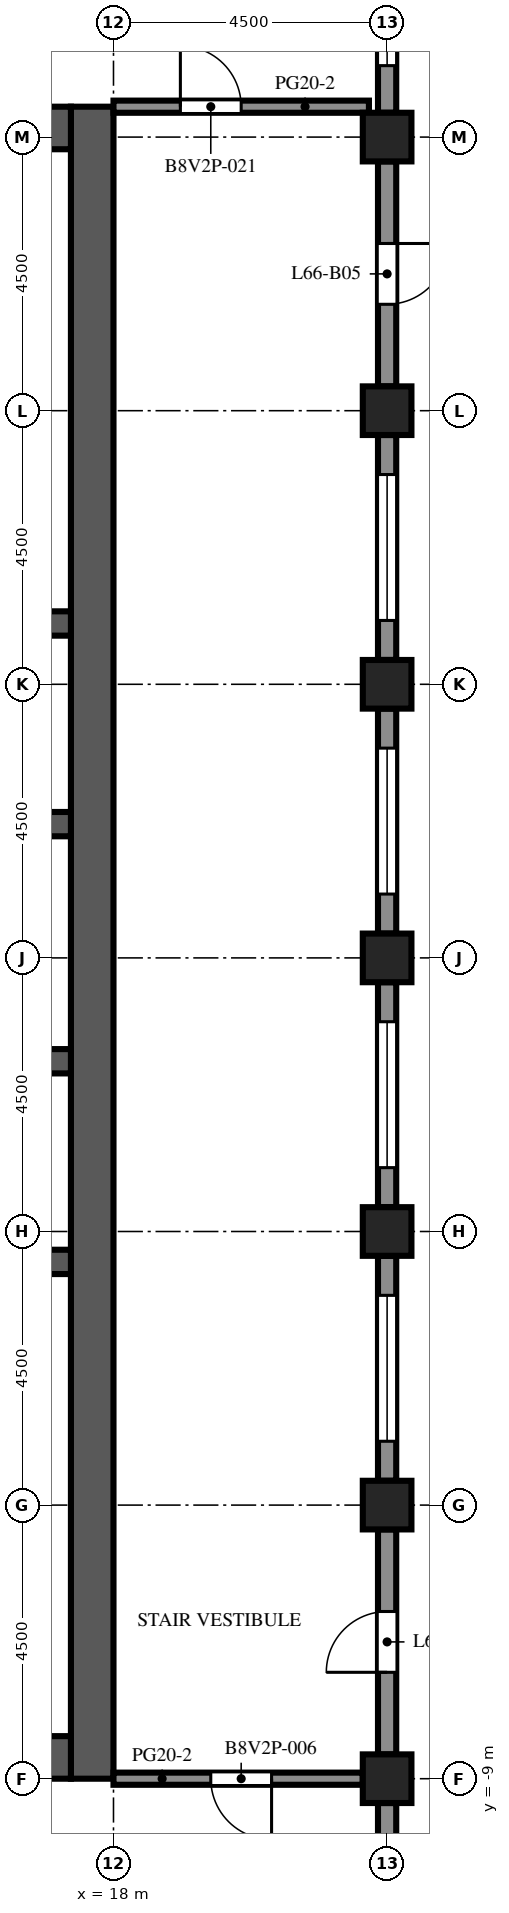
"""IFC4 building model, lengths in metres.
Left out: names, types, materials, properties, quantities, classifications, styles, units other than length and angle.
Written with IfcOpenShell. Run it as: python <this file> out.ifc"""

import sys

from ifc_helpers import new_model, si_unit, direction, frame, frame_2d, origin, origin_2d, place, context, subcontext, project, spatial, rectangle, extrude, element, fill, save


model = new_model("IFC4")
c1 = context("Model", 3, precision=1e-05, world=origin(), true_north=direction((0.0, 1.0)))
c2 = subcontext(c1, "Body", "Model", "MODEL_VIEW")
j1 = project(units=[si_unit("LENGTHUNIT", "METRE"), si_unit("PLANEANGLEUNIT", "RADIAN")], contexts=[c1])
p1 = place(None, origin())
s1 = spatial("IfcSite", under=j1, at=p1, CompositionType="ELEMENT")
p2 = place(p1, origin())
s2 = spatial("IfcBuilding", under=s1, at=p2, CompositionType="ELEMENT")
p3 = place(p2, frame((0.0, 0.0, 290.9)))
s3 = spatial("IfcBuildingStorey", under=s2, at=p3, CompositionType="ELEMENT", Elevation=290.9)
for number, where, z_axis, x_axis in (
    (1, (22.5, -9.0, 0.0), (0.0, 0.0, 1.0), (1.0, 0.0, 0.0)),
    (2, (22.5, -4.5, 0.0), (0.0, 0.0, 1.0), (1.0, 0.0, 0.0)),
    (3, (22.5, 0.0, 0.0), (0.0, 0.0, 1.0), (1.0, 0.0, 0.0)),
    (4, (22.5, 4.5, 0.0), (0.0, 0.0, 1.0), (1.0, 0.0, 0.0)),
    (5, (22.5, 9.0, 0.0), (0.0, 0.0, 1.0), (1.0, 0.0, 0.0)),
    (6, (22.5, 13.5, 0.0), (0.0, 0.0, 1.0), (1.0, 0.0, 0.0)),
    (7, (22.5, 18.0, 0.0), (0.0, 0.0, 1.0), (1.0, 0.0, 0.0)),
):
    element("IfcColumn", number, at=place(p3, frame(where, z_axis=z_axis, x_axis=x_axis)), inside=s3, PredefinedType="COLUMN", context=c2, shape_type="SweptSolid", body=[
        extrude(rectangle(XDim=0.8, YDim=0.8, at=origin_2d()), origin(), (0.0, 0.0, 1.0), 4.1),
    ])
p4 = place(p3, frame((17.65, -9.0, 0.0), z_axis=(0.0, 0.0, 1.0), x_axis=(0.0, 1.0, 0.0)))
e8 = element("IfcWall", 8, at=p4, inside=s3, PredefinedType="SHEAR", context=c2, shape_type="SweptSolid", body=[
    extrude(rectangle(XDim=27.5, YDim=0.7, at=frame_2d((13.75, 0.0))), origin(), (0.0, 0.0, 1.0), 4.1),
])
p5 = place(p4, frame((12.55, 0.0, 0.0)))
e9 = element("IfcOpeningElement", 9, at=p5, cuts=e8, PredefinedType="OPENING", context=c2, shape_type="SweptSolid", body=[
    extrude(rectangle(XDim=2.4, YDim=2.4, at=frame_2d((1.2, 1.2))), frame((0.0, 0.36, 0.0), z_axis=(0.0, -1.0, 0.0), x_axis=(1.0, 0.0, 0.0)), (0.0, 0.0, 1.0), 0.72),
])
p6 = place(p4, frame((6.825, 0.0, 0.0)))
e10 = element("IfcOpeningElement", 10, at=p6, cuts=e8, PredefinedType="OPENING", context=c2, shape_type="SweptSolid", body=[
    extrude(rectangle(XDim=1.2, YDim=2.1, at=frame_2d((0.6, 1.05))), frame((0.0, 0.36, 0.0), z_axis=(0.0, -1.0, 0.0), x_axis=(1.0, 0.0, 0.0)), (0.0, 0.0, 1.0), 0.72),
])
p7 = place(p4, frame((19.475, 0.0, 0.0)))
e11 = element("IfcOpeningElement", 11, at=p7, cuts=e8, PredefinedType="OPENING", context=c2, shape_type="SweptSolid", body=[
    extrude(rectangle(XDim=1.2, YDim=2.1, at=frame_2d((0.6, 1.05))), frame((0.0, 0.36, 0.0), z_axis=(0.0, -1.0, 0.0), x_axis=(1.0, 0.0, 0.0)), (0.0, 0.0, 1.0), 0.72),
])
for number, where, z_axis, x_axis in (
    (12, (6.7, -8.65, 0.0), (0.0, 0.0, 1.0), (1.0, 0.0, 0.0)),
    (13, (6.7, 18.15, 0.0), (0.0, 0.0, 1.0), (1.0, 0.0, 0.0)),
):
    element("IfcWall", number, at=place(p3, frame(where, z_axis=z_axis, x_axis=x_axis)), inside=s3, PredefinedType="SHEAR", context=c2, shape_type="SweptSolid", body=[
        extrude(rectangle(XDim=10.6, YDim=0.7, at=frame_2d((5.3, 0.0))), origin(), (0.0, 0.0, 1.0), 4.1),
    ])
p8 = place(p3, frame((6.7, -0.5, 0.0), z_axis=(0.0, 0.0, 1.0), x_axis=(1.0, 0.0, 0.0)))
e14 = element("IfcWall", 14, at=p8, inside=s3, PredefinedType="SHEAR", context=c2, shape_type="SweptSolid", body=[
    extrude(rectangle(XDim=10.6, YDim=0.4, at=frame_2d((5.3, 0.0))), origin(), (0.0, 0.0, 1.0), 4.1),
])
p9 = place(p3, frame((6.7, 2.8, 0.0), z_axis=(0.0, 0.0, 1.0), x_axis=(1.0, 0.0, 0.0)))
e15 = element("IfcWall", 15, at=p9, inside=s3, PredefinedType="SHEAR", context=c2, shape_type="SweptSolid", body=[
    extrude(rectangle(XDim=10.6, YDim=0.4, at=frame_2d((5.3, 0.0))), origin(), (0.0, 0.0, 1.0), 4.1),
])
p10 = place(p9, frame((0.688, 0.0, 0.0)))
e16 = element("IfcOpeningElement", 16, at=p10, cuts=e15, PredefinedType="OPENING", context=c2, shape_type="SweptSolid", body=[
    extrude(rectangle(XDim=1.1, YDim=2.1, at=frame_2d((0.55, 1.05))), frame((0.0, 0.21, 0.0), z_axis=(0.0, -1.0, 0.0), x_axis=(1.0, 0.0, 0.0)), (0.0, 0.0, 1.0), 0.42),
])
p11 = place(p9, frame((3.438, 0.0, 0.0)))
e17 = element("IfcOpeningElement", 17, at=p11, cuts=e15, PredefinedType="OPENING", context=c2, shape_type="SweptSolid", body=[
    extrude(rectangle(XDim=1.1, YDim=2.1, at=frame_2d((0.55, 1.05))), frame((0.0, 0.21, 0.0), z_axis=(0.0, -1.0, 0.0), x_axis=(1.0, 0.0, 0.0)), (0.0, 0.0, 1.0), 0.42),
])
p12 = place(p9, frame((6.113, 0.0, 0.0)))
e18 = element("IfcOpeningElement", 18, at=p12, cuts=e15, PredefinedType="OPENING", context=c2, shape_type="SweptSolid", body=[
    extrude(rectangle(XDim=1.0, YDim=2.1, at=frame_2d((0.5, 1.05))), frame((0.0, 0.21, 0.0), z_axis=(0.0, -1.0, 0.0), x_axis=(1.0, 0.0, 0.0)), (0.0, 0.0, 1.0), 0.42),
])
p13 = place(p9, frame((8.863, 0.0, 0.0)))
e19 = element("IfcOpeningElement", 19, at=p13, cuts=e15, PredefinedType="OPENING", context=c2, shape_type="SweptSolid", body=[
    extrude(rectangle(XDim=1.0, YDim=2.1, at=frame_2d((0.5, 1.05))), frame((0.0, 0.21, 0.0), z_axis=(0.0, -1.0, 0.0), x_axis=(1.0, 0.0, 0.0)), (0.0, 0.0, 1.0), 0.42),
])
p14 = place(p3, frame((6.7, 6.7, 0.0), z_axis=(0.0, 0.0, 1.0), x_axis=(1.0, 0.0, 0.0)))
e20 = element("IfcWall", 20, at=p14, inside=s3, PredefinedType="SHEAR", context=c2, shape_type="SweptSolid", body=[
    extrude(rectangle(XDim=10.6, YDim=0.4, at=frame_2d((5.3, 0.0))), origin(), (0.0, 0.0, 1.0), 4.1),
])
p15 = place(p14, frame((3.438, 0.0, 0.0)))
e21 = element("IfcOpeningElement", 21, at=p15, cuts=e20, PredefinedType="OPENING", context=c2, shape_type="SweptSolid", body=[
    extrude(rectangle(XDim=1.1, YDim=2.1, at=frame_2d((0.55, 1.05))), frame((0.0, 0.21, 0.0), z_axis=(0.0, -1.0, 0.0), x_axis=(1.0, 0.0, 0.0)), (0.0, 0.0, 1.0), 0.42),
])
p16 = place(p14, frame((6.062, 0.0, 0.0)))
e22 = element("IfcOpeningElement", 22, at=p16, cuts=e20, PredefinedType="OPENING", context=c2, shape_type="SweptSolid", body=[
    extrude(rectangle(XDim=1.1, YDim=2.1, at=frame_2d((0.55, 1.05))), frame((0.0, 0.21, 0.0), z_axis=(0.0, -1.0, 0.0), x_axis=(1.0, 0.0, 0.0)), (0.0, 0.0, 1.0), 0.42),
])
p17 = place(p14, frame((8.812, 0.0, 0.0)))
e23 = element("IfcOpeningElement", 23, at=p17, cuts=e20, PredefinedType="OPENING", context=c2, shape_type="SweptSolid", body=[
    extrude(rectangle(XDim=1.1, YDim=2.1, at=frame_2d((0.55, 1.05))), frame((0.0, 0.21, 0.0), z_axis=(0.0, -1.0, 0.0), x_axis=(1.0, 0.0, 0.0)), (0.0, 0.0, 1.0), 0.42),
])
p18 = place(p14, frame((0.738, 0.0, 0.0)))
e24 = element("IfcOpeningElement", 24, at=p18, cuts=e20, PredefinedType="OPENING", context=c2, shape_type="SweptSolid", body=[
    extrude(rectangle(XDim=1.0, YDim=2.1, at=frame_2d((0.5, 1.05))), frame((0.0, 0.21, 0.0), z_axis=(0.0, -1.0, 0.0), x_axis=(1.0, 0.0, 0.0)), (0.0, 0.0, 1.0), 0.42),
])
p19 = place(p3, frame((6.7, 10.0, 0.0), z_axis=(0.0, 0.0, 1.0), x_axis=(1.0, 0.0, 0.0)))
e25 = element("IfcWall", 25, at=p19, inside=s3, PredefinedType="SHEAR", context=c2, shape_type="SweptSolid", body=[
    extrude(rectangle(XDim=10.6, YDim=0.4, at=frame_2d((5.3, 0.0))), origin(), (0.0, 0.0, 1.0), 4.1),
])
p20 = place(p3, frame((22.5, -9.4, 0.0), z_axis=(0.0, 0.0, 1.0), x_axis=(0.0, -1.0, 0.0)))
e26 = element("IfcWall", 26, at=p20, inside=s3, PredefinedType="SOLIDWALL", context=c2, shape_type="SweptSolid", body=[
    extrude(rectangle(XDim=3.7, YDim=0.3, at=frame_2d((1.85, 0.0))), origin(), (0.0, 0.0, 1.0), 2.7),
])
p21 = place(p20, frame((0.65, 0.0, 0.8)))
e27 = element("IfcOpeningElement", 27, at=p21, cuts=e26, PredefinedType="OPENING", context=c2, shape_type="SweptSolid", body=[
    extrude(rectangle(XDim=2.4, YDim=1.7, at=frame_2d((1.2, 0.85))), frame((0.0, 0.16, 0.0), z_axis=(0.0, -1.0, 0.0), x_axis=(1.0, 0.0, 0.0)), (0.0, 0.0, 1.0), 0.32),
])
p22 = place(p3, frame((22.5, -4.9, 0.0), z_axis=(0.0, 0.0, 1.0), x_axis=(0.0, -1.0, 0.0)))
e28 = element("IfcWall", 28, at=p22, inside=s3, PredefinedType="SOLIDWALL", context=c2, shape_type="SweptSolid", body=[
    extrude(rectangle(XDim=3.7, YDim=0.3, at=frame_2d((1.85, 0.0))), origin(), (0.0, 0.0, 1.0), 2.7),
])
p23 = place(p22, frame((1.35, 0.0, 0.0)))
e29 = element("IfcOpeningElement", 29, at=p23, cuts=e28, PredefinedType="OPENING", context=c2, shape_type="SweptSolid", body=[
    extrude(rectangle(XDim=1.0, YDim=2.2, at=frame_2d((0.5, 1.1))), frame((0.0, 0.16, 0.0), z_axis=(0.0, -1.0, 0.0), x_axis=(1.0, 0.0, 0.0)), (0.0, 0.0, 1.0), 0.32),
])
p24 = place(p3, frame((22.5, -0.4, 0.0), z_axis=(0.0, 0.0, 1.0), x_axis=(0.0, -1.0, 0.0)))
e30 = element("IfcWall", 30, at=p24, inside=s3, PredefinedType="SOLIDWALL", context=c2, shape_type="SweptSolid", body=[
    extrude(rectangle(XDim=3.7, YDim=0.3, at=frame_2d((1.85, 0.0))), origin(), (0.0, 0.0, 1.0), 2.7),
])
p25 = place(p24, frame((0.65, 0.0, 0.8)))
e31 = element("IfcOpeningElement", 31, at=p25, cuts=e30, PredefinedType="OPENING", context=c2, shape_type="SweptSolid", body=[
    extrude(rectangle(XDim=2.4, YDim=1.7, at=frame_2d((1.2, 0.85))), frame((0.0, 0.16, 0.0), z_axis=(0.0, -1.0, 0.0), x_axis=(1.0, 0.0, 0.0)), (0.0, 0.0, 1.0), 0.32),
])
p26 = place(p3, frame((22.5, 4.1, 0.0), z_axis=(0.0, 0.0, 1.0), x_axis=(0.0, -1.0, 0.0)))
e32 = element("IfcWall", 32, at=p26, inside=s3, PredefinedType="SOLIDWALL", context=c2, shape_type="SweptSolid", body=[
    extrude(rectangle(XDim=3.7, YDim=0.3, at=frame_2d((1.85, 0.0))), origin(), (0.0, 0.0, 1.0), 2.7),
])
p27 = place(p26, frame((0.65, 0.0, 0.8)))
e33 = element("IfcOpeningElement", 33, at=p27, cuts=e32, PredefinedType="OPENING", context=c2, shape_type="SweptSolid", body=[
    extrude(rectangle(XDim=2.4, YDim=1.7, at=frame_2d((1.2, 0.85))), frame((0.0, 0.16, 0.0), z_axis=(0.0, -1.0, 0.0), x_axis=(1.0, 0.0, 0.0)), (0.0, 0.0, 1.0), 0.32),
])
p28 = place(p3, frame((22.5, 8.6, 0.0), z_axis=(0.0, 0.0, 1.0), x_axis=(0.0, -1.0, 0.0)))
e34 = element("IfcWall", 34, at=p28, inside=s3, PredefinedType="SOLIDWALL", context=c2, shape_type="SweptSolid", body=[
    extrude(rectangle(XDim=3.7, YDim=0.3, at=frame_2d((1.85, 0.0))), origin(), (0.0, 0.0, 1.0), 2.7),
])
p29 = place(p28, frame((0.65, 0.0, 0.8)))
e35 = element("IfcOpeningElement", 35, at=p29, cuts=e34, PredefinedType="OPENING", context=c2, shape_type="SweptSolid", body=[
    extrude(rectangle(XDim=2.4, YDim=1.7, at=frame_2d((1.2, 0.85))), frame((0.0, 0.16, 0.0), z_axis=(0.0, -1.0, 0.0), x_axis=(1.0, 0.0, 0.0)), (0.0, 0.0, 1.0), 0.32),
])
p30 = place(p3, frame((22.5, 13.1, 0.0), z_axis=(0.0, 0.0, 1.0), x_axis=(0.0, -1.0, 0.0)))
e36 = element("IfcWall", 36, at=p30, inside=s3, PredefinedType="SOLIDWALL", context=c2, shape_type="SweptSolid", body=[
    extrude(rectangle(XDim=3.7, YDim=0.3, at=frame_2d((1.85, 0.0))), origin(), (0.0, 0.0, 1.0), 2.7),
])
p31 = place(p30, frame((0.65, 0.0, 0.8)))
e37 = element("IfcOpeningElement", 37, at=p31, cuts=e36, PredefinedType="OPENING", context=c2, shape_type="SweptSolid", body=[
    extrude(rectangle(XDim=2.4, YDim=1.7, at=frame_2d((1.2, 0.85))), frame((0.0, 0.16, 0.0), z_axis=(0.0, -1.0, 0.0), x_axis=(1.0, 0.0, 0.0)), (0.0, 0.0, 1.0), 0.32),
])
p32 = place(p3, frame((22.5, 17.6, 0.0), z_axis=(0.0, 0.0, 1.0), x_axis=(0.0, -1.0, 0.0)))
e38 = element("IfcWall", 38, at=p32, inside=s3, PredefinedType="SOLIDWALL", context=c2, shape_type="SweptSolid", body=[
    extrude(rectangle(XDim=3.7, YDim=0.3, at=frame_2d((1.85, 0.0))), origin(), (0.0, 0.0, 1.0), 2.7),
])
p33 = place(p32, frame((1.35, 0.0, 0.0)))
e39 = element("IfcOpeningElement", 39, at=p33, cuts=e38, PredefinedType="OPENING", context=c2, shape_type="SweptSolid", body=[
    extrude(rectangle(XDim=1.0, YDim=2.2, at=frame_2d((0.5, 1.1))), frame((0.0, 0.16, 0.0), z_axis=(0.0, -1.0, 0.0), x_axis=(1.0, 0.0, 0.0)), (0.0, 0.0, 1.0), 0.32),
])
p34 = place(p3, frame((22.5, 22.1, 0.0), z_axis=(0.0, 0.0, 1.0), x_axis=(0.0, -1.0, 0.0)))
e40 = element("IfcWall", 40, at=p34, inside=s3, PredefinedType="SOLIDWALL", context=c2, shape_type="SweptSolid", body=[
    extrude(rectangle(XDim=3.7, YDim=0.3, at=frame_2d((1.85, 0.0))), origin(), (0.0, 0.0, 1.0), 2.7),
])
p35 = place(p34, frame((0.525, 0.0, 0.8)))
e41 = element("IfcOpeningElement", 41, at=p35, cuts=e40, PredefinedType="OPENING", context=c2, shape_type="SweptSolid", body=[
    extrude(rectangle(XDim=2.4, YDim=1.7, at=frame_2d((1.2, 0.85))), frame((0.0, 0.16, 0.0), z_axis=(0.0, -1.0, 0.0), x_axis=(1.0, 0.0, 0.0)), (0.0, 0.0, 1.0), 0.32),
])
p36 = place(p3, frame((22.1, -9.0, 0.0), z_axis=(0.0, 0.0, 1.0), x_axis=(-1.0, 0.0, 0.0)))
e42 = element("IfcWall", 42, at=p36, inside=s3, PredefinedType="PARTITIONING", context=c2, shape_type="SweptSolid", body=[
    extrude(rectangle(XDim=4.1, YDim=0.2, at=frame_2d((2.05, 0.0))), origin(), (0.0, 0.0, 1.0), 3.5),
])
p37 = place(p36, frame((1.5, 0.0, 0.0)))
e43 = element("IfcOpeningElement", 43, at=p37, cuts=e42, PredefinedType="OPENING", context=c2, shape_type="SweptSolid", body=[
    extrude(rectangle(XDim=1.0, YDim=2.1, at=frame_2d((0.5, 1.05))), frame((0.0, 0.11, 0.0), z_axis=(0.0, -1.0, 0.0), x_axis=(1.0, 0.0, 0.0)), (0.0, 0.0, 1.0), 0.22),
])
p38 = place(p3, frame((18.0, 18.5, 0.0), z_axis=(0.0, 0.0, 1.0), x_axis=(1.0, 0.0, 0.0)))
e44 = element("IfcWall", 44, at=p38, inside=s3, PredefinedType="PARTITIONING", context=c2, shape_type="SweptSolid", body=[
    extrude(rectangle(XDim=4.201, YDim=0.2, at=frame_2d((2.101, 0.0))), origin(), (0.0, 0.0, 1.0), 3.5),
])
p39 = place(p38, frame((1.1, 0.0, 0.0)))
e45 = element("IfcOpeningElement", 45, at=p39, cuts=e44, PredefinedType="OPENING", context=c2, shape_type="SweptSolid", body=[
    extrude(rectangle(XDim=1.0, YDim=2.1, at=frame_2d((0.5, 1.05))), frame((0.0, 0.11, 0.0), z_axis=(0.0, -1.0, 0.0), x_axis=(1.0, 0.0, 0.0)), (0.0, 0.0, 1.0), 0.22),
])
p40 = place(p23, origin())
e46 = element("IfcDoor", 46, at=p40, inside=s3, OperationType="SINGLE_SWING_RIGHT", PredefinedType="DOOR", context=c2, shape_type="SweptSolid", body=[
    extrude(rectangle(XDim=1.0, YDim=2.2, at=frame_2d((0.5, 1.1))), frame((0.0, 0.025, 0.0), z_axis=(0.0, -1.0, 0.0), x_axis=(1.0, 0.0, 0.0)), (0.0, 0.0, 1.0), 0.05),
])
fill(e29, e46)
p41 = place(p25, origin())
e47 = element("IfcWindow", 47, at=p41, inside=s3, PartitioningType="SINGLE_PANEL", PredefinedType="WINDOW", context=c2, shape_type="SweptSolid", body=[
    extrude(rectangle(XDim=2.4, YDim=1.7, at=frame_2d((1.2, 0.85))), frame((0.0, 0.03, 0.0), z_axis=(0.0, -1.0, 0.0), x_axis=(1.0, 0.0, 0.0)), (0.0, 0.0, 1.0), 0.06),
])
fill(e31, e47)
p42 = place(p27, origin())
e48 = element("IfcWindow", 48, at=p42, inside=s3, PartitioningType="SINGLE_PANEL", PredefinedType="WINDOW", context=c2, shape_type="SweptSolid", body=[
    extrude(rectangle(XDim=2.4, YDim=1.7, at=frame_2d((1.2, 0.85))), frame((0.0, 0.03, 0.0), z_axis=(0.0, -1.0, 0.0), x_axis=(1.0, 0.0, 0.0)), (0.0, 0.0, 1.0), 0.06),
])
fill(e33, e48)
p43 = place(p29, origin())
e49 = element("IfcWindow", 49, at=p43, inside=s3, PartitioningType="SINGLE_PANEL", PredefinedType="WINDOW", context=c2, shape_type="SweptSolid", body=[
    extrude(rectangle(XDim=2.4, YDim=1.7, at=frame_2d((1.2, 0.85))), frame((0.0, 0.03, 0.0), z_axis=(0.0, -1.0, 0.0), x_axis=(1.0, 0.0, 0.0)), (0.0, 0.0, 1.0), 0.06),
])
fill(e35, e49)
p44 = place(p31, origin())
e50 = element("IfcWindow", 50, at=p44, inside=s3, PartitioningType="SINGLE_PANEL", PredefinedType="WINDOW", context=c2, shape_type="SweptSolid", body=[
    extrude(rectangle(XDim=2.4, YDim=1.7, at=frame_2d((1.2, 0.85))), frame((0.0, 0.03, 0.0), z_axis=(0.0, -1.0, 0.0), x_axis=(1.0, 0.0, 0.0)), (0.0, 0.0, 1.0), 0.06),
])
fill(e37, e50)
p45 = place(p33, origin())
e51 = element("IfcDoor", 51, at=p45, inside=s3, OperationType="SINGLE_SWING_LEFT", PredefinedType="DOOR", context=c2, shape_type="SweptSolid", body=[
    extrude(rectangle(XDim=1.0, YDim=2.2, at=frame_2d((0.5, 1.1))), frame((0.0, 0.025, 0.0), z_axis=(0.0, -1.0, 0.0), x_axis=(1.0, 0.0, 0.0)), (0.0, 0.0, 1.0), 0.05),
])
fill(e39, e51)
p46 = place(p35, origin())
e52 = element("IfcWindow", 52, at=p46, inside=s3, PartitioningType="SINGLE_PANEL", PredefinedType="WINDOW", context=c2, shape_type="SweptSolid", body=[
    extrude(rectangle(XDim=2.4, YDim=1.7, at=frame_2d((1.2, 0.85))), frame((0.0, 0.03, 0.0), z_axis=(0.0, -1.0, 0.0), x_axis=(1.0, 0.0, 0.0)), (0.0, 0.0, 1.0), 0.06),
])
fill(e41, e52)
p47 = place(p5, origin())
e53 = element("IfcDoor", 53, at=p47, inside=s3, OperationType="DOUBLE_DOOR_DOUBLE_SWING", PredefinedType="DOOR", context=c2, shape_type="SweptSolid", body=[
    extrude(rectangle(XDim=2.4, YDim=2.4, at=frame_2d((1.2, 1.2))), frame((0.0, 0.025, 0.0), z_axis=(0.0, -1.0, 0.0), x_axis=(1.0, 0.0, 0.0)), (0.0, 0.0, 1.0), 0.05),
])
fill(e9, e53)
p48 = place(p6, frame((1.2, 0.0, 0.0), z_axis=(0.0, 0.0, 1.0), x_axis=(-1.0, 0.0, 0.0)))
e54 = element("IfcDoor", 54, at=p48, inside=s3, OperationType="SINGLE_SWING_LEFT", PredefinedType="DOOR", context=c2, shape_type="SweptSolid", body=[
    extrude(rectangle(XDim=1.2, YDim=2.1, at=frame_2d((0.6, 1.05))), frame((0.0, 0.025, 0.0), z_axis=(0.0, -1.0, 0.0), x_axis=(1.0, 0.0, 0.0)), (0.0, 0.0, 1.0), 0.05),
])
fill(e10, e54)
p49 = place(p7, frame((1.2, 0.0, 0.0), z_axis=(0.0, 0.0, 1.0), x_axis=(-1.0, 0.0, 0.0)))
e55 = element("IfcDoor", 55, at=p49, inside=s3, OperationType="SINGLE_SWING_LEFT", PredefinedType="DOOR", context=c2, shape_type="SweptSolid", body=[
    extrude(rectangle(XDim=1.2, YDim=2.1, at=frame_2d((0.6, 1.05))), frame((0.0, 0.025, 0.0), z_axis=(0.0, -1.0, 0.0), x_axis=(1.0, 0.0, 0.0)), (0.0, 0.0, 1.0), 0.05),
])
fill(e11, e55)
p50 = place(p37, origin())
e56 = element("IfcDoor", 56, at=p50, inside=s3, OperationType="SINGLE_SWING_LEFT", PredefinedType="DOOR", context=c2, shape_type="SweptSolid", body=[
    extrude(rectangle(XDim=1.0, YDim=2.1, at=frame_2d((0.5, 1.05))), frame((0.0, 0.025, 0.0), z_axis=(0.0, -1.0, 0.0), x_axis=(1.0, 0.0, 0.0)), (0.0, 0.0, 1.0), 0.05),
])
fill(e43, e56)
p51 = place(p39, origin())
e57 = element("IfcDoor", 57, at=p51, inside=s3, OperationType="SINGLE_SWING_LEFT", PredefinedType="DOOR", context=c2, shape_type="SweptSolid", body=[
    extrude(rectangle(XDim=1.0, YDim=2.1, at=frame_2d((0.5, 1.05))), frame((0.0, 0.025, 0.0), z_axis=(0.0, -1.0, 0.0), x_axis=(1.0, 0.0, 0.0)), (0.0, 0.0, 1.0), 0.05),
])
fill(e45, e57)
save(model, sys.argv[1])
